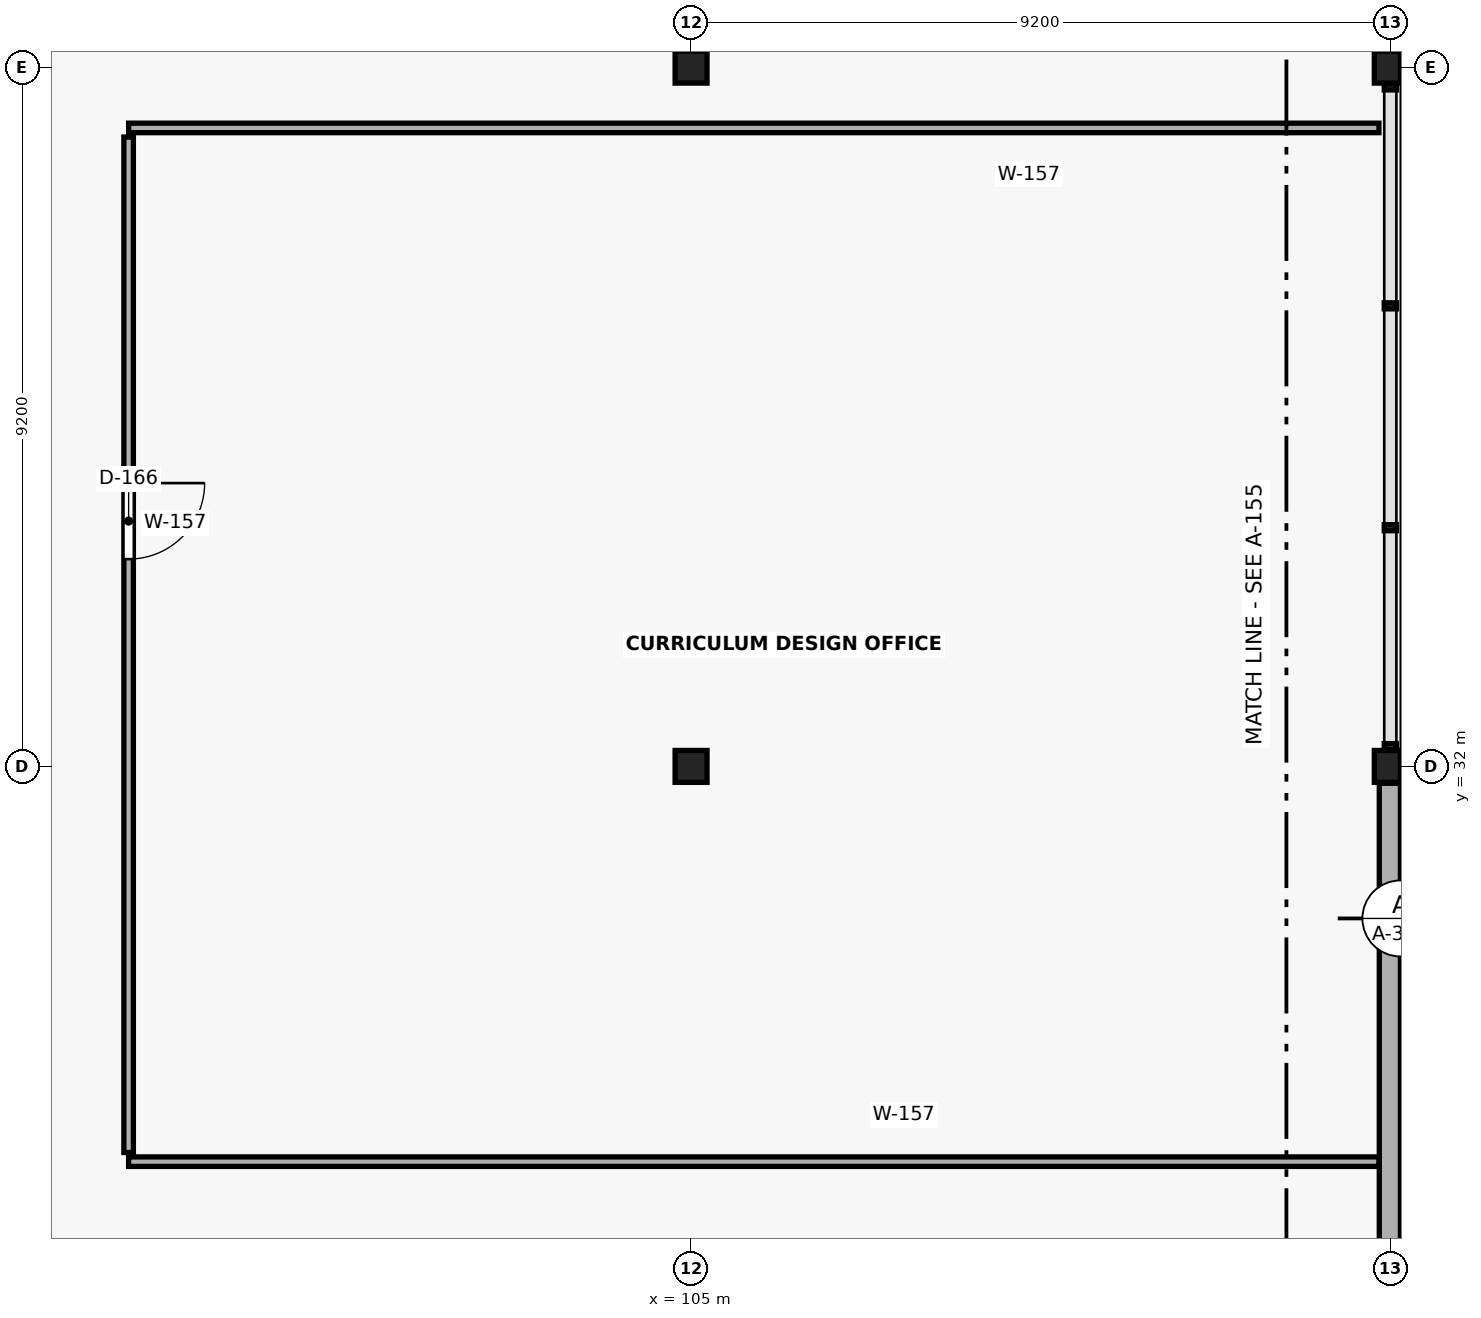
"""IFC4 building model, lengths in metres.
Left out: names, types, materials, properties, quantities, classifications, styles, units other than length and angle.
Written with IfcOpenShell. Run it as: python <this file> out.ifc"""

import sys

from ifc_helpers import new_model, si_unit, direction, frame, frame_2d, origin, origin_2d, place, context, subcontext, project, spatial, rectangle, extrude, element, fill, save


model = new_model("IFC4")
c1 = context("Model", 3, precision=1e-05, world=origin(), true_north=direction((0.0, 1.0)))
c2 = subcontext(c1, "Body", "Model", "MODEL_VIEW")
j1 = project(units=[si_unit("LENGTHUNIT", "METRE"), si_unit("PLANEANGLEUNIT", "RADIAN")], contexts=[c1])
p1 = place(None, origin())
s1 = spatial("IfcSite", under=j1, at=p1, CompositionType="ELEMENT")
p2 = place(p1, origin())
s2 = spatial("IfcBuilding", under=s1, at=p2, CompositionType="ELEMENT")
p3 = place(p2, frame((0.0, 0.0, 18.3)))
s3 = spatial("IfcBuildingStorey", under=s2, at=p3, CompositionType="ELEMENT", Elevation=18.3)
for number, where, z_axis, x_axis in (
    (1, (105.0, 32.0, 0.0), (0.0, 0.0, 1.0), (1.0, 0.0, 0.0)),
    (2, (105.0, 41.2, 0.0), (0.0, 0.0, 1.0), (1.0, 0.0, 0.0)),
    (3, (114.2, 32.0, 0.0), (0.0, 0.0, 1.0), (1.0, 0.0, 0.0)),
    (4, (114.2, 41.2, 0.0), (0.0, 0.0, 1.0), (1.0, 0.0, 0.0)),
):
    element("IfcColumn", number, at=place(p3, frame(where, z_axis=z_axis, x_axis=x_axis)), inside=s3, PredefinedType="COLUMN", context=c2, shape_type="SweptSolid", body=[
        extrude(rectangle(XDim=0.42, YDim=0.42, at=origin_2d()), origin(), (0.0, 0.0, 1.0), 3.9),
    ])
p4 = place(p3, frame((114.2, 31.778, 0.0), z_axis=(0.0, 0.0, 1.0), x_axis=(0.0, -1.0, 0.0)))
e5 = element("IfcWall", 5, at=p4, inside=s3, PredefinedType="SOLIDWALL", context=c2, shape_type="SweptSolid", body=[
    extrude(rectangle(XDim=8.388, YDim=0.29, at=frame_2d((4.194, 0.0))), origin(), (0.0, 0.0, 1.0), 2.855),
])
for number, where, z_axis, x_axis in (
    (6, (97.6, 26.8, 0.0), (0.0, 0.0, 1.0), (1.0, 0.0, 0.0)),
    (7, (114.05, 40.4, 0.0), (0.0, 0.0, 1.0), (-1.0, 0.0, 0.0)),
):
    element("IfcWall", number, at=place(p3, frame(where, z_axis=z_axis, x_axis=x_axis)), inside=s3, PredefinedType="PARTITIONING", context=c2, shape_type="SweptSolid", body=[
        extrude(rectangle(XDim=16.45, YDim=0.125, at=frame_2d((8.225, 0.0))), origin(), (0.0, 0.0, 1.0), 3.655),
    ])
p5 = place(p3, frame((97.6, 40.28, 0.0), z_axis=(0.0, 0.0, 1.0), x_axis=(0.0, -1.0, 0.0)))
e8 = element("IfcWall", 8, at=p5, inside=s3, PredefinedType="PARTITIONING", context=c2, shape_type="SweptSolid", body=[
    extrude(rectangle(XDim=13.36, YDim=0.125, at=frame_2d((6.68, 0.0))), origin(), (0.0, 0.0, 1.0), 3.655),
])
p6 = place(p5, frame((4.552, 0.0, 0.0)))
e9 = element("IfcOpeningElement", 9, at=p6, cuts=e8, PredefinedType="OPENING", context=c2, shape_type="SweptSolid", body=[
    extrude(rectangle(XDim=1.0, YDim=2.25, at=frame_2d((0.5, 1.125))), frame((0.0, 0.074, 0.0), z_axis=(0.0, -1.0, 0.0), x_axis=(1.0, 0.0, 0.0)), (0.0, 0.0, 1.0), 0.149),
])
p7 = place(p6, origin())
e10 = element("IfcDoor", 10, at=p7, inside=s3, OperationType="SINGLE_SWING_LEFT", PredefinedType="DOOR", context=c2, shape_type="SweptSolid", body=[
    extrude(rectangle(XDim=1.0, YDim=2.25, at=frame_2d((0.5, 1.125))), frame((0.0, 0.025, 0.0), z_axis=(0.0, -1.0, 0.0), x_axis=(1.0, 0.0, 0.0)), (0.0, 0.0, 1.0), 0.05),
])
fill(e9, e10)
save(model, sys.argv[1])
